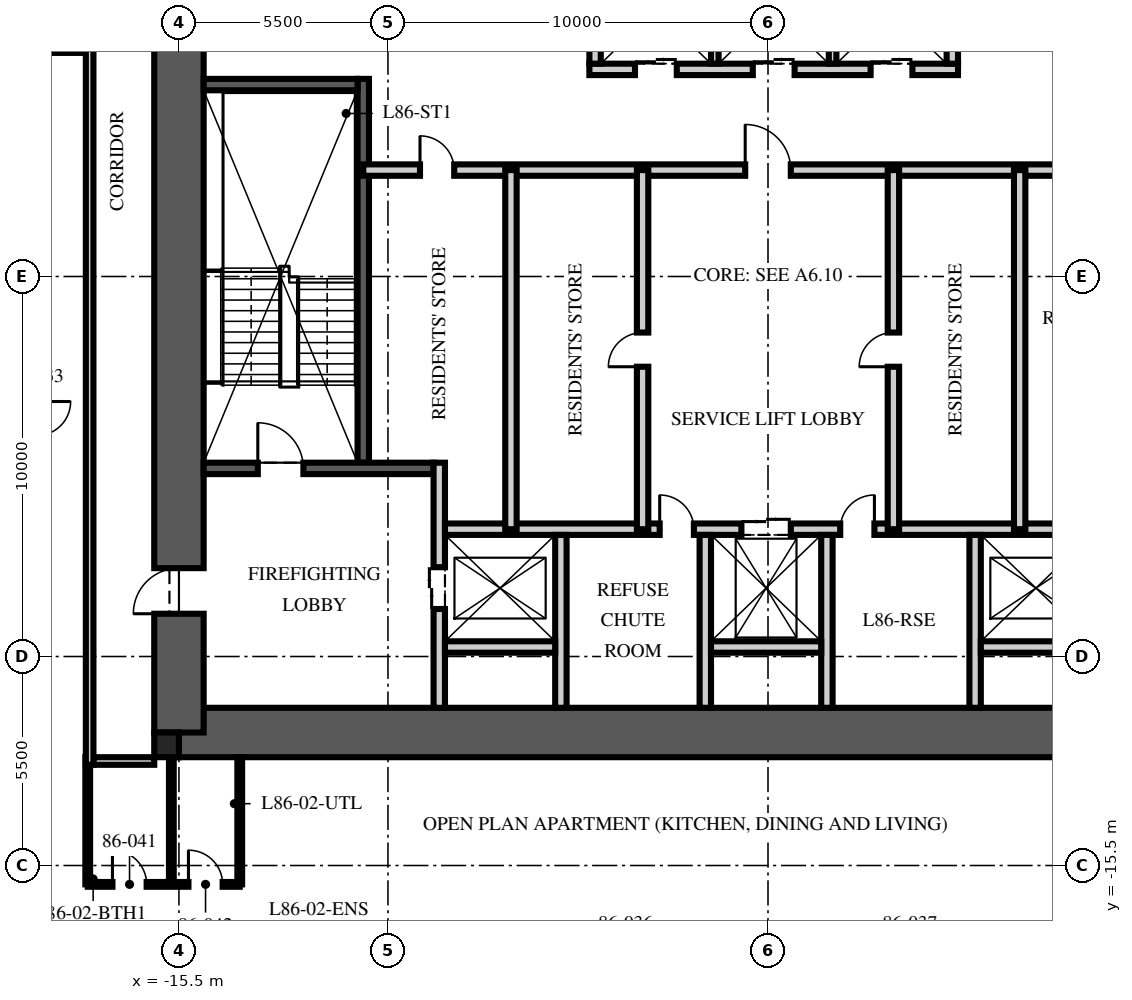
"""IFC4 building model, lengths in metres.
Left out: names, types, materials, properties, quantities, classifications, styles, units other than length and angle.
Written with IfcOpenShell. Run it as: python <this file> out.ifc"""

import sys

from ifc_helpers import new_model, si_unit, direction, frame, frame_2d, origin, origin_2d, place, context, subcontext, project, spatial, rectangle, extrude, element, fill, save


model = new_model("IFC4")
c1 = context("Model", 3, precision=1e-05, world=origin(), true_north=direction((0.0, 1.0)))
c2 = subcontext(c1, "Body", "Model", "MODEL_VIEW")
j1 = project(units=[si_unit("LENGTHUNIT", "METRE"), si_unit("PLANEANGLEUNIT", "RADIAN")], contexts=[c1])
p1 = place(None, origin())
s1 = spatial("IfcSite", under=j1, at=p1, CompositionType="ELEMENT")
p2 = place(p1, origin())
s2 = spatial("IfcBuilding", under=s1, at=p2, CompositionType="ELEMENT")
p3 = place(p2, frame((0.0, 0.0, 342.0)))
s3 = spatial("IfcBuildingStorey", under=s2, at=p3, CompositionType="ELEMENT", Elevation=342.0)
p4 = place(p3, frame((-15.5, -12.0, -0.25), z_axis=(0.0, 0.0, 1.0), x_axis=(1.0, 0.0, 0.0)))
e1 = element("IfcWall", 1, at=p4, inside=s3, PredefinedType="SHEAR", context=c2, shape_type="SweptSolid", body=[
    extrude(rectangle(XDim=31.0, YDim=1.3, at=frame_2d((15.5, 0.0))), origin(), (0.0, 0.0, 1.0), 3.75),
])
p5 = place(p3, frame((-15.5, -12.0, -0.25), z_axis=(0.0, 0.0, 1.0), x_axis=(0.0, 1.0, 0.0)))
e2 = element("IfcWall", 2, at=p5, inside=s3, PredefinedType="SHEAR", context=c2, shape_type="SweptSolid", body=[
    extrude(rectangle(XDim=24.0, YDim=1.3, at=frame_2d((12.0, 0.0))), origin(), (0.0, 0.0, 1.0), 3.75),
])
p6 = place(p5, frame((3.125, 0.0, 0.25)))
e3 = element("IfcOpeningElement", 3, at=p6, cuts=e2, PredefinedType="OPENING", context=c2, shape_type="SweptSolid", body=[
    extrude(rectangle(XDim=1.2, YDim=2.1, at=frame_2d((0.6, 1.05))), frame((0.0, 0.66, 0.0), z_axis=(0.0, -1.0, 0.0), x_axis=(1.0, 0.0, 0.0)), (0.0, 0.0, 1.0), 1.32),
])
p7 = place(p5, frame((19.375, 0.0, 0.25)))
e4 = element("IfcOpeningElement", 4, at=p7, cuts=e2, PredefinedType="OPENING", context=c2, shape_type="SweptSolid", body=[
    extrude(rectangle(XDim=1.8, YDim=2.1, at=frame_2d((0.9, 1.05))), frame((0.0, 0.66, 0.0), z_axis=(0.0, -1.0, 0.0), x_axis=(1.0, 0.0, 0.0)), (0.0, 0.0, 1.0), 1.32),
])
p8 = place(p3, frame((-15.825, -12.325, -0.25), z_axis=(0.0, 0.0, 1.0), x_axis=(1.0, 0.0, 0.0)))
e5 = element("IfcColumn", 5, at=p8, inside=s3, PredefinedType="COLUMN", context=c2, shape_type="SweptSolid", body=[
    extrude(rectangle(XDim=0.65, YDim=0.65, at=origin_2d()), origin(), (0.0, 0.0, 1.0), 3.75),
])
p9 = place(p3, frame((-10.65, -4.9, 0.0), z_axis=(0.0, 0.0, 1.0), x_axis=(0.0, 1.0, 0.0)))
e6 = element("IfcWall", 6, at=p9, inside=s3, PredefinedType="SOLIDWALL", context=c2, shape_type="SweptSolid", body=[
    extrude(rectangle(XDim=10.1, YDim=0.3, at=frame_2d((5.05, 0.0))), origin(), (0.0, 0.0, 1.0), 3.5),
])
p10 = place(p3, frame((-14.85, -5.05, 0.0), z_axis=(0.0, 0.0, 1.0), x_axis=(1.0, 0.0, 0.0)))
e7 = element("IfcWall", 7, at=p10, inside=s3, PredefinedType="SOLIDWALL", context=c2, shape_type="SweptSolid", body=[
    extrude(rectangle(XDim=6.05, YDim=0.3, at=frame_2d((3.025, 0.0))), origin(), (0.0, 0.0, 1.0), 3.5),
])
p11 = place(p10, frame((1.425, 0.0, 0.0)))
e8 = element("IfcOpeningElement", 8, at=p11, cuts=e7, PredefinedType="OPENING", context=c2, shape_type="SweptSolid", body=[
    extrude(rectangle(XDim=1.2, YDim=2.1, at=frame_2d((0.6, 1.05))), frame((0.0, 0.16, 0.0), z_axis=(0.0, -1.0, 0.0), x_axis=(1.0, 0.0, 0.0)), (0.0, 0.0, 1.0), 0.32),
])
p12 = place(p3, frame((-14.85, 5.05, 0.0), z_axis=(0.0, 0.0, 1.0), x_axis=(1.0, 0.0, 0.0)))
e9 = element("IfcWall", 9, at=p12, inside=s3, PredefinedType="SOLIDWALL", context=c2, shape_type="SweptSolid", body=[
    extrude(rectangle(XDim=4.05, YDim=0.3, at=frame_2d((2.025, 0.0))), origin(), (0.0, 0.0, 1.0), 3.5),
])
p13 = place(p3, frame((-8.65, -11.35, 0.0), z_axis=(0.0, 0.0, 1.0), x_axis=(0.0, 1.0, 0.0)))
e10 = element("IfcWall", 10, at=p13, inside=s3, PredefinedType="PARTITIONING", context=c2, shape_type="SweptSolid", body=[
    extrude(rectangle(XDim=6.45, YDim=0.3, at=frame_2d((3.225, 0.0))), origin(), (0.0, 0.0, 1.0), 3.5),
])
p14 = place(p13, frame((2.6, 0.0, 0.0)))
e11 = element("IfcOpeningElement", 11, at=p14, cuts=e10, PredefinedType="OPENING", context=c2, shape_type="SweptSolid", body=[
    extrude(rectangle(XDim=1.1, YDim=2.1, at=frame_2d((0.55, 1.05))), frame((0.0, 0.16, 0.0), z_axis=(0.0, -1.0, 0.0), x_axis=(1.0, 0.0, 0.0)), (0.0, 0.0, 1.0), 0.32),
])
p15 = place(p3, frame((-8.5, -6.65, 0.0), z_axis=(0.0, 0.0, 1.0), x_axis=(1.0, 0.0, 0.0)))
e12 = element("IfcWall", 12, at=p15, inside=s3, PredefinedType="PARTITIONING", context=c2, shape_type="SweptSolid", body=[
    extrude(rectangle(XDim=17.0, YDim=0.3, at=frame_2d((8.5, 0.0))), origin(), (0.0, 0.0, 1.0), 3.5),
])
p16 = place(p15, frame((7.8, 0.0, 0.0)))
e13 = element("IfcOpeningElement", 13, at=p16, cuts=e12, PredefinedType="OPENING", context=c2, shape_type="SweptSolid", body=[
    extrude(rectangle(XDim=1.3, YDim=2.4, at=frame_2d((0.65, 1.2))), frame((0.0, 0.16, 0.0), z_axis=(0.0, -1.0, 0.0), x_axis=(1.0, 0.0, 0.0)), (0.0, 0.0, 1.0), 0.32),
])
p17 = place(p15, frame((5.65, 0.0, 0.0)))
e14 = element("IfcOpeningElement", 14, at=p17, cuts=e12, PredefinedType="OPENING", context=c2, shape_type="SweptSolid", body=[
    extrude(rectangle(XDim=0.9, YDim=2.1, at=frame_2d((0.45, 1.05))), frame((0.0, 0.16, 0.0), z_axis=(0.0, -1.0, 0.0), x_axis=(1.0, 0.0, 0.0)), (0.0, 0.0, 1.0), 0.32),
])
p18 = place(p15, frame((10.4, 0.0, 0.0)))
e15 = element("IfcOpeningElement", 15, at=p18, cuts=e12, PredefinedType="OPENING", context=c2, shape_type="SweptSolid", body=[
    extrude(rectangle(XDim=0.9, YDim=2.1, at=frame_2d((0.45, 1.05))), frame((0.0, 0.16, 0.0), z_axis=(0.0, -1.0, 0.0), x_axis=(1.0, 0.0, 0.0)), (0.0, 0.0, 1.0), 0.32),
])
for number, where, z_axis, x_axis in (
    (16, (-5.45, -11.35, 0.0), (0.0, 0.0, 1.0), (0.0, 1.0, 0.0)),
    (17, (-1.65, -11.35, 0.0), (0.0, 0.0, 1.0), (0.0, 1.0, 0.0)),
    (18, (1.55, -11.35, 0.0), (0.0, 0.0, 1.0), (0.0, 1.0, 0.0)),
    (19, (5.45, -11.35, 0.0), (0.0, 0.0, 1.0), (0.0, 1.0, 0.0)),
):
    element("IfcWall", number, at=place(p3, frame(where, z_axis=z_axis, x_axis=x_axis)), inside=s3, PredefinedType="PARTITIONING", context=c2, shape_type="SweptSolid", body=[
        extrude(rectangle(XDim=4.55, YDim=0.3, at=frame_2d((2.275, 0.0))), origin(), (0.0, 0.0, 1.0), 3.5),
    ])
for number, where, z_axis, x_axis in (
    (20, (-8.5, -9.75, 0.0), (0.0, 0.0, 1.0), (1.0, 0.0, 0.0)),
    (21, (-1.5, -9.75, 0.0), (0.0, 0.0, 1.0), (1.0, 0.0, 0.0)),
    (22, (5.6, -9.75, 0.0), (0.0, 0.0, 1.0), (1.0, 0.0, 0.0)),
):
    element("IfcWall", number, at=place(p3, frame(where, z_axis=z_axis, x_axis=x_axis)), inside=s3, PredefinedType="PARTITIONING", context=c2, shape_type="SweptSolid", body=[
        extrude(rectangle(XDim=2.9, YDim=0.3, at=frame_2d((1.45, 0.0))), origin(), (0.0, 0.0, 1.0), 3.5),
    ])
p19 = place(p3, frame((-4.7, 5.45, 0.0), z_axis=(0.0, 0.0, 1.0), x_axis=(1.0, 0.0, 0.0)))
e23 = element("IfcWall", 23, at=p19, inside=s3, PredefinedType="PARTITIONING", context=c2, shape_type="SweptSolid", body=[
    extrude(rectangle(XDim=9.7, YDim=0.3, at=frame_2d((4.85, 0.0))), origin(), (0.0, 0.0, 1.0), 3.5),
])
p20 = place(p19, frame((1.2, 0.0, 0.0)))
e24 = element("IfcOpeningElement", 24, at=p20, cuts=e23, PredefinedType="OPENING", context=c2, shape_type="SweptSolid", body=[
    extrude(rectangle(XDim=1.1, YDim=2.1, at=frame_2d((0.55, 1.05))), frame((0.0, 0.16, 0.0), z_axis=(0.0, -1.0, 0.0), x_axis=(1.0, 0.0, 0.0)), (0.0, 0.0, 1.0), 0.32),
])
p21 = place(p19, frame((4.3, 0.0, 0.0)))
e25 = element("IfcOpeningElement", 25, at=p21, cuts=e23, PredefinedType="OPENING", context=c2, shape_type="SweptSolid", body=[
    extrude(rectangle(XDim=1.1, YDim=2.1, at=frame_2d((0.55, 1.05))), frame((0.0, 0.16, 0.0), z_axis=(0.0, -1.0, 0.0), x_axis=(1.0, 0.0, 0.0)), (0.0, 0.0, 1.0), 0.32),
])
p22 = place(p19, frame((7.4, 0.0, 0.0)))
e26 = element("IfcOpeningElement", 26, at=p22, cuts=e23, PredefinedType="OPENING", context=c2, shape_type="SweptSolid", body=[
    extrude(rectangle(XDim=1.1, YDim=2.1, at=frame_2d((0.55, 1.05))), frame((0.0, 0.16, 0.0), z_axis=(0.0, -1.0, 0.0), x_axis=(1.0, 0.0, 0.0)), (0.0, 0.0, 1.0), 0.32),
])
for number, where, z_axis, x_axis in (
    (27, (-4.55, 5.6, 0.0), (0.0, 0.0, 1.0), (0.0, 1.0, 0.0)),
    (28, (4.85, 5.6, 0.0), (0.0, 0.0, 1.0), (0.0, 1.0, 0.0)),
):
    element("IfcWall", number, at=place(p3, frame(where, z_axis=z_axis, x_axis=x_axis)), inside=s3, PredefinedType="PARTITIONING", context=c2, shape_type="SweptSolid", body=[
        extrude(rectangle(XDim=2.8, YDim=0.3, at=frame_2d((1.4, 0.0))), origin(), (0.0, 0.0, 1.0), 3.5),
    ])
for number, where, z_axis, x_axis in (
    (29, (-1.4, 5.6, 0.0), (0.0, 0.0, 1.0), (0.0, 1.0, 0.0)),
    (30, (1.7, 5.6, 0.0), (0.0, 0.0, 1.0), (0.0, 1.0, 0.0)),
):
    element("IfcWall", number, at=place(p3, frame(where, z_axis=z_axis, x_axis=x_axis)), inside=s3, PredefinedType="PARTITIONING", context=c2, shape_type="SweptSolid", body=[
        extrude(rectangle(XDim=2.8, YDim=0.2, at=frame_2d((1.4, 0.0))), origin(), (0.0, 0.0, 1.0), 3.5),
    ])
p23 = place(p3, frame((-10.65, 2.8, 0.0), z_axis=(0.0, 0.0, 1.0), x_axis=(1.0, 0.0, 0.0)))
e31 = element("IfcWall", 31, at=p23, inside=s3, PredefinedType="PARTITIONING", context=c2, shape_type="SweptSolid", body=[
    extrude(rectangle(XDim=21.3, YDim=0.3, at=frame_2d((10.65, 0.0))), origin(), (0.0, 0.0, 1.0), 3.5),
])
p24 = place(p23, frame((10.05, 0.0, 0.0)))
e32 = element("IfcOpeningElement", 32, at=p24, cuts=e31, PredefinedType="OPENING", context=c2, shape_type="SweptSolid", body=[
    extrude(rectangle(XDim=1.2, YDim=2.1, at=frame_2d((0.6, 1.05))), frame((0.0, 0.16, 0.0), z_axis=(0.0, -1.0, 0.0), x_axis=(1.0, 0.0, 0.0)), (0.0, 0.0, 1.0), 0.32),
])
p25 = place(p23, frame((1.493, 0.0, 0.0)))
e33 = element("IfcOpeningElement", 33, at=p25, cuts=e31, PredefinedType="OPENING", context=c2, shape_type="SweptSolid", body=[
    extrude(rectangle(XDim=0.9, YDim=2.1, at=frame_2d((0.45, 1.05))), frame((0.0, 0.16, 0.0), z_axis=(0.0, -1.0, 0.0), x_axis=(1.0, 0.0, 0.0)), (0.0, 0.0, 1.0), 0.32),
])
p26 = place(p23, frame((18.836, 0.0, 0.0)))
e34 = element("IfcOpeningElement", 34, at=p26, cuts=e31, PredefinedType="OPENING", context=c2, shape_type="SweptSolid", body=[
    extrude(rectangle(XDim=0.9, YDim=2.1, at=frame_2d((0.45, 1.05))), frame((0.0, 0.16, 0.0), z_axis=(0.0, -1.0, 0.0), x_axis=(1.0, 0.0, 0.0)), (0.0, 0.0, 1.0), 0.32),
])
p27 = place(p3, frame((-3.3, -6.65, 0.0), z_axis=(0.0, 0.0, 1.0), x_axis=(0.0, 1.0, 0.0)))
e35 = element("IfcWall", 35, at=p27, inside=s3, PredefinedType="PARTITIONING", context=c2, shape_type="SweptSolid", body=[
    extrude(rectangle(XDim=9.45, YDim=0.3, at=frame_2d((4.725, 0.0))), origin(), (0.0, 0.0, 1.0), 3.5),
])
p28 = place(p27, frame((4.275, 0.0, 0.0)))
e36 = element("IfcOpeningElement", 36, at=p28, cuts=e35, PredefinedType="OPENING", context=c2, shape_type="SweptSolid", body=[
    extrude(rectangle(XDim=0.9, YDim=2.1, at=frame_2d((0.45, 1.05))), frame((0.0, 0.16, 0.0), z_axis=(0.0, -1.0, 0.0), x_axis=(1.0, 0.0, 0.0)), (0.0, 0.0, 1.0), 0.32),
])
p29 = place(p3, frame((3.3, -6.65, 0.0), z_axis=(0.0, 0.0, 1.0), x_axis=(0.0, 1.0, 0.0)))
e37 = element("IfcWall", 37, at=p29, inside=s3, PredefinedType="PARTITIONING", context=c2, shape_type="SweptSolid", body=[
    extrude(rectangle(XDim=9.45, YDim=0.3, at=frame_2d((4.725, 0.0))), origin(), (0.0, 0.0, 1.0), 3.5),
])
p30 = place(p29, frame((4.275, 0.0, 0.0)))
e38 = element("IfcOpeningElement", 38, at=p30, cuts=e37, PredefinedType="OPENING", context=c2, shape_type="SweptSolid", body=[
    extrude(rectangle(XDim=0.9, YDim=2.1, at=frame_2d((0.45, 1.05))), frame((0.0, 0.16, 0.0), z_axis=(0.0, -1.0, 0.0), x_axis=(1.0, 0.0, 0.0)), (0.0, 0.0, 1.0), 0.32),
])
for number, where, z_axis, x_axis in (
    (39, (-6.764, -6.65, 0.0), (0.0, 0.0, 1.0), (0.0, 1.0, 0.0)),
    (40, (6.622, -6.65, 0.0), (0.0, 0.0, 1.0), (0.0, 1.0, 0.0)),
):
    element("IfcWall", number, at=place(p3, frame(where, z_axis=z_axis, x_axis=x_axis)), inside=s3, PredefinedType="PARTITIONING", context=c2, shape_type="SweptSolid", body=[
        extrude(rectangle(XDim=9.45, YDim=0.3, at=frame_2d((4.725, 0.0))), origin(), (0.0, 0.0, 1.0), 3.5),
    ])
p31 = place(p3, frame((-16.15, -12.75, 0.0), z_axis=(0.0, 0.0, 1.0), x_axis=(-1.0, 0.0, 0.0)))
e41 = element("IfcWall", 41, at=p31, inside=s3, PredefinedType="PARTITIONING", context=c2, shape_type="SweptSolid", body=[
    extrude(rectangle(XDim=1.6, YDim=0.2, at=frame_2d((0.8, 0.0))), origin(), (0.0, 0.0, 1.0), 2.6),
])
p32 = place(p3, frame((-17.95, 5.984, 0.0), z_axis=(0.0, 0.0, 1.0), x_axis=(-1.0, 0.0, 0.0)))
e42 = element("IfcWall", 42, at=p32, inside=s3, PredefinedType="PARTITIONING", context=c2, shape_type="SweptSolid", body=[
    extrude(rectangle(XDim=4.8, YDim=0.2, at=frame_2d((2.4, 0.0))), origin(), (0.0, 0.0, 1.0), 3.01),
])
p33 = place(p3, frame((-17.9, -15.996, 0.0), z_axis=(0.0, 0.0, 1.0), x_axis=(1.0, 0.0, 0.0)))
e43 = element("IfcWall", 43, at=p33, inside=s3, PredefinedType="PARTITIONING", context=c2, shape_type="SweptSolid", body=[
    extrude(rectangle(XDim=4.0, YDim=0.125, at=frame_2d((2.0, 0.0))), origin(), (0.0, 0.0, 1.0), 2.6),
])
p34 = place(p33, frame((0.65, 0.0, 0.0)))
e44 = element("IfcOpeningElement", 44, at=p34, cuts=e43, PredefinedType="OPENING", context=c2, shape_type="SweptSolid", body=[
    extrude(rectangle(XDim=0.9, YDim=2.1, at=frame_2d((0.45, 1.05))), frame((0.0, 0.073, 0.0), z_axis=(0.0, -1.0, 0.0), x_axis=(1.0, 0.0, 0.0)), (0.0, 0.0, 1.0), 0.145),
])
p35 = place(p33, frame((2.65, 0.0, 0.0)))
e45 = element("IfcOpeningElement", 45, at=p35, cuts=e43, PredefinedType="OPENING", context=c2, shape_type="SweptSolid", body=[
    extrude(rectangle(XDim=0.9, YDim=2.1, at=frame_2d((0.45, 1.05))), frame((0.0, 0.073, 0.0), z_axis=(0.0, -1.0, 0.0), x_axis=(1.0, 0.0, 0.0)), (0.0, 0.0, 1.0), 0.145),
])
for number, where, z_axis, x_axis in (
    (46, (-17.9, -12.65, 0.0), (0.0, 0.0, 1.0), (0.0, -1.0, 0.0)),
    (47, (-15.7, -12.65, 0.0), (0.0, 0.0, 1.0), (0.0, -1.0, 0.0)),
):
    element("IfcWall", number, at=place(p3, frame(where, z_axis=z_axis, x_axis=x_axis)), inside=s3, PredefinedType="PARTITIONING", context=c2, shape_type="SweptSolid", body=[
        extrude(rectangle(XDim=3.346, YDim=0.125, at=frame_2d((1.673, 0.0))), origin(), (0.0, 0.0, 1.0), 2.6),
    ])
p36 = place(p3, frame((-13.9, -12.65, 0.0), z_axis=(0.0, 0.0, 1.0), x_axis=(0.0, -1.0, 0.0)))
e48 = element("IfcWall", 48, at=p36, inside=s3, PredefinedType="PARTITIONING", context=c2, shape_type="SweptSolid", body=[
    extrude(rectangle(XDim=3.346, YDim=0.125, at=frame_2d((1.673, 0.0))), origin(), (0.0, 0.0, 1.0), 3.5),
])
p37 = place(p3, frame((-17.85, 12.65, 0.0), z_axis=(0.0, 0.0, 1.0), x_axis=(0.0, -1.0, 0.0)))
e49 = element("IfcWall", 49, at=p37, inside=s3, PredefinedType="PARTITIONING", context=c2, shape_type="SweptSolid", body=[
    extrude(rectangle(XDim=25.5, YDim=0.2, at=frame_2d((12.75, 0.0))), origin(), (0.0, 0.0, 1.0), 2.9),
])
p38 = place(p11, origin())
e50 = element("IfcDoor", 50, at=p38, inside=s3, OperationType="SINGLE_SWING_LEFT", PredefinedType="DOOR", context=c2, shape_type="SweptSolid", body=[
    extrude(rectangle(XDim=1.2, YDim=2.1, at=frame_2d((0.6, 1.05))), frame((0.0, 0.025, 0.0), z_axis=(0.0, -1.0, 0.0), x_axis=(1.0, 0.0, 0.0)), (0.0, 0.0, 1.0), 0.05),
])
fill(e8, e50)
p39 = place(p6, origin())
e51 = element("IfcDoor", 51, at=p39, inside=s3, OperationType="SINGLE_SWING_LEFT", PredefinedType="DOOR", context=c2, shape_type="SweptSolid", body=[
    extrude(rectangle(XDim=1.2, YDim=2.1, at=frame_2d((0.6, 1.05))), frame((0.0, 0.025, 0.0), z_axis=(0.0, -1.0, 0.0), x_axis=(1.0, 0.0, 0.0)), (0.0, 0.0, 1.0), 0.05),
])
fill(e3, e51)
p40 = place(p14, origin())
e52 = element("IfcDoor", 52, at=p40, inside=s3, OperationType="DOUBLE_DOOR_SLIDING", PredefinedType="DOOR", context=c2, shape_type="SweptSolid", body=[
    extrude(rectangle(XDim=1.1, YDim=2.1, at=frame_2d((0.55, 1.05))), frame((0.0, 0.025, 0.0), z_axis=(0.0, -1.0, 0.0), x_axis=(1.0, 0.0, 0.0)), (0.0, 0.0, 1.0), 0.05),
])
fill(e11, e52)
p41 = place(p20, origin())
e53 = element("IfcDoor", 53, at=p41, inside=s3, OperationType="DOUBLE_DOOR_SLIDING", PredefinedType="DOOR", context=c2, shape_type="SweptSolid", body=[
    extrude(rectangle(XDim=1.1, YDim=2.1, at=frame_2d((0.55, 1.05))), frame((0.0, 0.025, 0.0), z_axis=(0.0, -1.0, 0.0), x_axis=(1.0, 0.0, 0.0)), (0.0, 0.0, 1.0), 0.05),
])
fill(e24, e53)
p42 = place(p21, origin())
e54 = element("IfcDoor", 54, at=p42, inside=s3, OperationType="DOUBLE_DOOR_SLIDING", PredefinedType="DOOR", context=c2, shape_type="SweptSolid", body=[
    extrude(rectangle(XDim=1.1, YDim=2.1, at=frame_2d((0.55, 1.05))), frame((0.0, 0.025, 0.0), z_axis=(0.0, -1.0, 0.0), x_axis=(1.0, 0.0, 0.0)), (0.0, 0.0, 1.0), 0.05),
])
fill(e25, e54)
p43 = place(p22, origin())
e55 = element("IfcDoor", 55, at=p43, inside=s3, OperationType="DOUBLE_DOOR_SLIDING", PredefinedType="DOOR", context=c2, shape_type="SweptSolid", body=[
    extrude(rectangle(XDim=1.1, YDim=2.1, at=frame_2d((0.55, 1.05))), frame((0.0, 0.025, 0.0), z_axis=(0.0, -1.0, 0.0), x_axis=(1.0, 0.0, 0.0)), (0.0, 0.0, 1.0), 0.05),
])
fill(e26, e55)
p44 = place(p16, origin())
e56 = element("IfcDoor", 56, at=p44, inside=s3, OperationType="DOUBLE_DOOR_SLIDING", PredefinedType="DOOR", context=c2, shape_type="SweptSolid", body=[
    extrude(rectangle(XDim=1.3, YDim=2.4, at=frame_2d((0.65, 1.2))), frame((0.0, 0.025, 0.0), z_axis=(0.0, -1.0, 0.0), x_axis=(1.0, 0.0, 0.0)), (0.0, 0.0, 1.0), 0.05),
])
fill(e13, e56)
p45 = place(p24, origin())
e57 = element("IfcDoor", 57, at=p45, inside=s3, OperationType="SINGLE_SWING_LEFT", PredefinedType="DOOR", context=c2, shape_type="SweptSolid", body=[
    extrude(rectangle(XDim=1.2, YDim=2.1, at=frame_2d((0.6, 1.05))), frame((0.0, 0.025, 0.0), z_axis=(0.0, -1.0, 0.0), x_axis=(1.0, 0.0, 0.0)), (0.0, 0.0, 1.0), 0.05),
])
fill(e32, e57)
p46 = place(p17, origin())
e58 = element("IfcDoor", 58, at=p46, inside=s3, OperationType="SINGLE_SWING_LEFT", PredefinedType="DOOR", context=c2, shape_type="SweptSolid", body=[
    extrude(rectangle(XDim=0.9, YDim=2.1, at=frame_2d((0.45, 1.05))), frame((0.0, 0.025, 0.0), z_axis=(0.0, -1.0, 0.0), x_axis=(1.0, 0.0, 0.0)), (0.0, 0.0, 1.0), 0.05),
])
fill(e14, e58)
p47 = place(p18, origin())
e59 = element("IfcDoor", 59, at=p47, inside=s3, OperationType="SINGLE_SWING_RIGHT", PredefinedType="DOOR", context=c2, shape_type="SweptSolid", body=[
    extrude(rectangle(XDim=0.9, YDim=2.1, at=frame_2d((0.45, 1.05))), frame((0.0, 0.025, 0.0), z_axis=(0.0, -1.0, 0.0), x_axis=(1.0, 0.0, 0.0)), (0.0, 0.0, 1.0), 0.05),
])
fill(e15, e59)
p48 = place(p28, origin())
e60 = element("IfcDoor", 60, at=p48, inside=s3, OperationType="SINGLE_SWING_LEFT", PredefinedType="DOOR", context=c2, shape_type="SweptSolid", body=[
    extrude(rectangle(XDim=0.9, YDim=2.1, at=frame_2d((0.45, 1.05))), frame((0.0, 0.025, 0.0), z_axis=(0.0, -1.0, 0.0), x_axis=(1.0, 0.0, 0.0)), (0.0, 0.0, 1.0), 0.05),
])
fill(e36, e60)
p49 = place(p25, origin())
e61 = element("IfcDoor", 61, at=p49, inside=s3, OperationType="SINGLE_SWING_LEFT", PredefinedType="DOOR", context=c2, shape_type="SweptSolid", body=[
    extrude(rectangle(XDim=0.9, YDim=2.1, at=frame_2d((0.45, 1.05))), frame((0.0, 0.025, 0.0), z_axis=(0.0, -1.0, 0.0), x_axis=(1.0, 0.0, 0.0)), (0.0, 0.0, 1.0), 0.05),
])
fill(e33, e61)
p50 = place(p30, origin())
e62 = element("IfcDoor", 62, at=p50, inside=s3, OperationType="SINGLE_SWING_LEFT", PredefinedType="DOOR", context=c2, shape_type="SweptSolid", body=[
    extrude(rectangle(XDim=0.9, YDim=2.1, at=frame_2d((0.45, 1.05))), frame((0.0, 0.025, 0.0), z_axis=(0.0, -1.0, 0.0), x_axis=(1.0, 0.0, 0.0)), (0.0, 0.0, 1.0), 0.05),
])
fill(e38, e62)
p51 = place(p34, origin())
e63 = element("IfcDoor", 63, at=p51, inside=s3, OperationType="SINGLE_SWING_LEFT", PredefinedType="DOOR", context=c2, shape_type="SweptSolid", body=[
    extrude(rectangle(XDim=0.9, YDim=2.1, at=frame_2d((0.45, 1.05))), frame((0.0, 0.025, 0.0), z_axis=(0.0, -1.0, 0.0), x_axis=(1.0, 0.0, 0.0)), (0.0, 0.0, 1.0), 0.05),
])
fill(e44, e63)
p52 = place(p35, origin())
e64 = element("IfcDoor", 64, at=p52, inside=s3, OperationType="SINGLE_SWING_LEFT", PredefinedType="DOOR", context=c2, shape_type="SweptSolid", body=[
    extrude(rectangle(XDim=0.9, YDim=2.1, at=frame_2d((0.45, 1.05))), frame((0.0, 0.025, 0.0), z_axis=(0.0, -1.0, 0.0), x_axis=(1.0, 0.0, 0.0)), (0.0, 0.0, 1.0), 0.05),
])
fill(e45, e64)
save(model, sys.argv[1])
